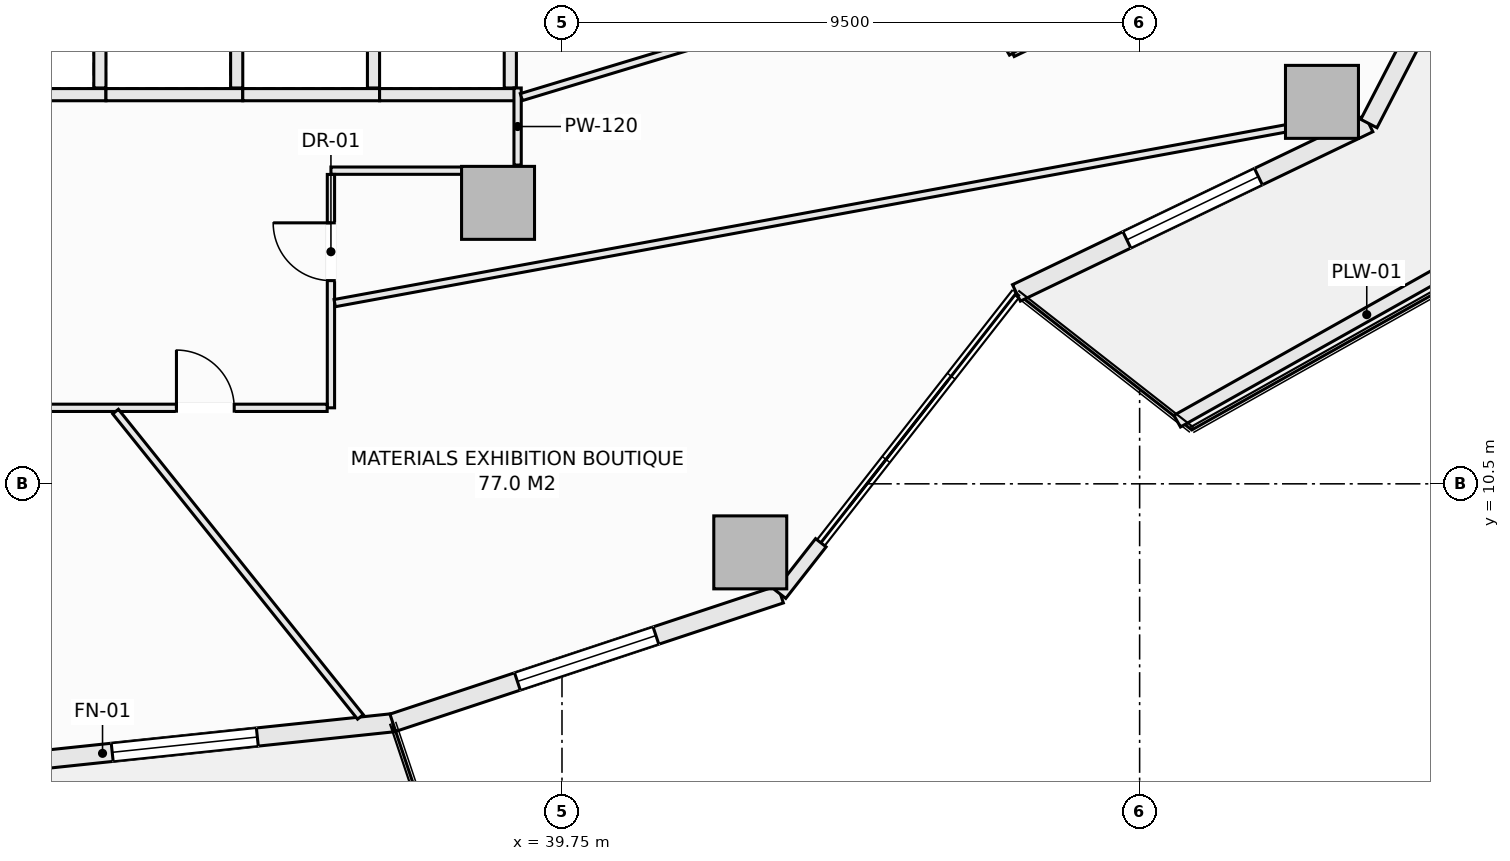
"""IFC4 building model, lengths in metres.
Left out: names, types, materials, properties, quantities, classifications, styles, units other than length and angle.
Written with IfcOpenShell. Run it as: python <this file> out.ifc"""

import sys

from ifc_helpers import new_model, si_unit, direction, frame, frame_2d, origin, origin_2d, place, context, subcontext, project, spatial, rectangle, extrude, element, fill, save


model = new_model("IFC4")
c1 = context("Model", 3, precision=1e-05, world=origin(), true_north=direction((0.0, 1.0)))
c2 = subcontext(c1, "Body", "Model", "MODEL_VIEW")
j1 = project(units=[si_unit("LENGTHUNIT", "METRE"), si_unit("PLANEANGLEUNIT", "RADIAN")], contexts=[c1])
p1 = place(None, origin())
s1 = spatial("IfcSite", under=j1, at=p1, CompositionType="ELEMENT")
p2 = place(p1, origin())
s2 = spatial("IfcBuilding", under=s1, at=p2, CompositionType="ELEMENT")
p3 = place(p2, frame((0.0, 0.0, 53.45)))
s3 = spatial("IfcBuildingStorey", under=s2, at=p3, CompositionType="ELEMENT", Elevation=53.45)
for number, where, z_axis, x_axis in (
    (1, (42.846, 9.373, -0.28), (0.0, 0.0, 1.0), (1.0, 0.0, 0.0)),
    (2, (52.249, 16.781, -0.28), (0.0, 0.0, 1.0), (1.0, 0.0, 0.0)),
    (3, (38.698, 15.121, -0.28), (0.0, 0.0, 1.0), (1.0, 0.0, 0.0)),
):
    element("IfcColumn", number, at=place(p3, frame(where, z_axis=z_axis, x_axis=x_axis)), inside=s3, PredefinedType="COLUMN", context=c2, shape_type="SweptSolid", body=[
        extrude(rectangle(XDim=1.2, YDim=1.2, at=origin_2d()), origin(), (0.0, 0.0, 1.0), 3.85),
    ])
p4 = place(p3, frame((30.125, 5.85, 0.0), z_axis=(0.0, 0.0, 1.0), x_axis=(0.994498840295, 0.104747585419, 0.0)))
e4 = element("IfcWall", 4, at=p4, inside=s3, PredefinedType="SOLIDWALL", context=c2, shape_type="SweptSolid", body=[
    extrude(rectangle(XDim=6.88, YDim=0.3, at=frame_2d((3.44, 0.0))), origin(), (0.0, 0.0, 1.0), 3.093),
])
p5 = place(p4, frame((2.24, 0.0, 0.85)))
e5 = element("IfcOpeningElement", 5, at=p5, cuts=e4, PredefinedType="OPENING", context=c2, shape_type="SweptSolid", body=[
    extrude(rectangle(XDim=2.4, YDim=1.9, at=frame_2d((1.2, 0.95))), frame((0.0, 0.16, 0.0), z_axis=(0.0, -1.0, 0.0), x_axis=(1.0, 0.0, 0.0)), (0.0, 0.0, 1.0), 0.32),
])
p6 = place(p3, frame((36.968, 6.571, 0.0), z_axis=(0.0, 0.0, 1.0), x_axis=(0.949245153629, 0.314537181127, 0.0)))
e6 = element("IfcWall", 6, at=p6, inside=s3, PredefinedType="SOLIDWALL", context=c2, shape_type="SweptSolid", body=[
    extrude(rectangle(XDim=6.717, YDim=0.3, at=frame_2d((3.358, 0.0))), origin(), (0.0, 0.0, 1.0), 3.093),
])
p7 = place(p6, frame((2.159, 0.0, 0.85)))
e7 = element("IfcOpeningElement", 7, at=p7, cuts=e6, PredefinedType="OPENING", context=c2, shape_type="SweptSolid", body=[
    extrude(rectangle(XDim=2.4, YDim=1.9, at=frame_2d((1.2, 0.95))), frame((0.0, 0.16, 0.0), z_axis=(0.0, -1.0, 0.0), x_axis=(1.0, 0.0, 0.0)), (0.0, 0.0, 1.0), 0.32),
])
p8 = place(p3, frame((43.344, 8.684, 0.0), z_axis=(0.0, 0.0, 1.0), x_axis=(0.616387780378, 0.787442762492, 0.0)))
e8 = element("IfcWall", 8, at=p8, inside=s3, PredefinedType="SOLIDWALL", context=c2, shape_type="SweptSolid", body=[
    extrude(rectangle(XDim=1.076, YDim=0.22, at=frame_2d((0.538, 0.0))), origin(), (0.0, 0.0, 1.0), 3.093),
])
p9 = place(p3, frame((47.224, 13.64, 0.0), z_axis=(0.0, 0.0, 1.0), x_axis=(0.901354747727, 0.433081538224, 0.0)))
e9 = element("IfcWall", 9, at=p9, inside=s3, PredefinedType="SOLIDWALL", context=c2, shape_type="SweptSolid", body=[
    extrude(rectangle(XDim=6.431, YDim=0.3, at=frame_2d((3.215, 0.0))), origin(), (0.0, 0.0, 1.0), 3.093),
])
p10 = place(p9, frame((2.015, 0.0, 0.85)))
e10 = element("IfcOpeningElement", 10, at=p10, cuts=e9, PredefinedType="OPENING", context=c2, shape_type="SweptSolid", body=[
    extrude(rectangle(XDim=2.4, YDim=1.9, at=frame_2d((1.2, 0.95))), frame((0.0, 0.16, 0.0), z_axis=(0.0, -1.0, 0.0), x_axis=(1.0, 0.0, 0.0)), (0.0, 0.0, 1.0), 0.32),
])
p11 = place(p3, frame((53.021, 16.425, 0.0), z_axis=(0.0, 0.0, 1.0), x_axis=(0.459800981414, 0.888021991558, 0.0)))
e11 = element("IfcWall", 11, at=p11, inside=s3, PredefinedType="SOLIDWALL", context=c2, shape_type="SweptSolid", body=[
    extrude(rectangle(XDim=5.744, YDim=0.3, at=frame_2d((2.872, 0.0))), origin(), (0.0, 0.0, 1.0), 3.093),
])
p12 = place(p11, frame((1.972, 0.0, 0.0)))
e12 = element("IfcOpeningElement", 12, at=p12, cuts=e11, PredefinedType="OPENING", context=c2, shape_type="SweptSolid", body=[
    extrude(rectangle(XDim=1.8, YDim=2.25, at=frame_2d((0.9, 1.125))), frame((0.0, 0.16, 0.0), z_axis=(0.0, -1.0, 0.0), x_axis=(1.0, 0.0, 0.0)), (0.0, 0.0, 1.0), 0.32),
])
p13 = place(p3, frame((49.868, 11.531, 0.0), z_axis=(0.0, 0.0, 1.0), x_axis=(0.871775109335, 0.489906275468, 0.0)))
e13 = element("IfcWall", 13, at=p13, inside=s3, PredefinedType="PARAPET", context=c2, shape_type="SweptSolid", body=[
    extrude(rectangle(XDim=7.152, YDim=0.22, at=frame_2d((3.576, 0.0))), origin(), (0.0, 0.0, 1.0), 0.52),
])
p14 = place(p3, frame((29.8, 16.9, 0.0), z_axis=(0.0, 0.0, 1.0), x_axis=(1.0, 0.0, 0.0)))
e14 = element("IfcWall", 14, at=p14, inside=s3, PredefinedType="SOLIDWALL", context=c2, shape_type="SweptSolid", body=[
    extrude(rectangle(XDim=2.45, YDim=0.2, at=frame_2d((1.225, 0.0))), origin(), (0.0, 0.0, 1.0), 3.57),
])
p15 = place(p3, frame((32.15, 17.01, 0.0), z_axis=(0.0, 0.0, 1.0), x_axis=(0.0, 1.0, 0.0)))
e15 = element("IfcWall", 15, at=p15, inside=s3, PredefinedType="SOLIDWALL", context=c2, shape_type="SweptSolid", body=[
    extrude(rectangle(XDim=2.43, YDim=0.2, at=frame_2d((1.215, 0.0))), origin(), (0.0, 0.0, 1.0), 3.57),
])
p16 = place(p3, frame((32.25, 16.9, 0.0), z_axis=(0.0, 0.0, 1.0), x_axis=(1.0, 0.0, 0.0)))
e16 = element("IfcWall", 16, at=p16, inside=s3, PredefinedType="SOLIDWALL", context=c2, shape_type="SweptSolid", body=[
    extrude(rectangle(XDim=2.25, YDim=0.2, at=frame_2d((1.125, 0.0))), origin(), (0.0, 0.0, 1.0), 3.57),
])
p17 = place(p3, frame((34.4, 17.01, 0.0), z_axis=(0.0, 0.0, 1.0), x_axis=(0.0, 1.0, 0.0)))
e17 = element("IfcWall", 17, at=p17, inside=s3, PredefinedType="SOLIDWALL", context=c2, shape_type="SweptSolid", body=[
    extrude(rectangle(XDim=2.43, YDim=0.2, at=frame_2d((1.215, 0.0))), origin(), (0.0, 0.0, 1.0), 3.57),
])
p18 = place(p3, frame((34.5, 16.9, 0.0), z_axis=(0.0, 0.0, 1.0), x_axis=(1.0, 0.0, 0.0)))
e18 = element("IfcWall", 18, at=p18, inside=s3, PredefinedType="SOLIDWALL", context=c2, shape_type="SweptSolid", body=[
    extrude(rectangle(XDim=2.25, YDim=0.2, at=frame_2d((1.125, 0.0))), origin(), (0.0, 0.0, 1.0), 3.57),
])
p19 = place(p3, frame((36.65, 17.01, 0.0), z_axis=(0.0, 0.0, 1.0), x_axis=(0.0, 1.0, 0.0)))
e19 = element("IfcWall", 19, at=p19, inside=s3, PredefinedType="SOLIDWALL", context=c2, shape_type="SweptSolid", body=[
    extrude(rectangle(XDim=2.43, YDim=0.2, at=frame_2d((1.215, 0.0))), origin(), (0.0, 0.0, 1.0), 3.57),
])
p20 = place(p3, frame((36.75, 16.9, 0.0), z_axis=(0.0, 0.0, 1.0), x_axis=(1.0, 0.0, 0.0)))
e20 = element("IfcWall", 20, at=p20, inside=s3, PredefinedType="SOLIDWALL", context=c2, shape_type="SweptSolid", body=[
    extrude(rectangle(XDim=2.25, YDim=0.2, at=frame_2d((1.125, 0.0))), origin(), (0.0, 0.0, 1.0), 3.57),
])
p21 = place(p3, frame((38.9, 17.01, 0.0), z_axis=(0.0, 0.0, 1.0), x_axis=(0.0, 1.0, 0.0)))
e21 = element("IfcWall", 21, at=p21, inside=s3, PredefinedType="SOLIDWALL", context=c2, shape_type="SweptSolid", body=[
    extrude(rectangle(XDim=2.43, YDim=0.2, at=frame_2d((1.215, 0.0))), origin(), (0.0, 0.0, 1.0), 3.57),
])
p22 = place(p3, frame((35.95, 15.65, 0.0), z_axis=(0.0, 0.0, 1.0), x_axis=(1.0, 0.0, 0.0)))
e22 = element("IfcWall", 22, at=p22, inside=s3, PredefinedType="PARTITIONING", context=c2, shape_type="SweptSolid", body=[
    extrude(rectangle(XDim=2.291, YDim=0.12, at=frame_2d((1.146, 0.0))), origin(), (0.0, 0.0, 1.0), 3.57),
])
p23 = place(p3, frame((35.95, 11.75, 0.0), z_axis=(0.0, 0.0, 1.0), x_axis=(0.0, 1.0, 0.0)))
e23 = element("IfcWall", 23, at=p23, inside=s3, PredefinedType="PARTITIONING", context=c2, shape_type="SweptSolid", body=[
    extrude(rectangle(XDim=3.838, YDim=0.12, at=frame_2d((1.919, 0.0))), origin(), (0.0, 0.0, 1.0), 3.57),
])
p24 = place(p23, frame((2.092, 0.0, 0.0)))
e24 = element("IfcOpeningElement", 24, at=p24, cuts=e23, PredefinedType="OPENING", context=c2, shape_type="SweptSolid", body=[
    extrude(rectangle(XDim=0.95, YDim=2.1, at=frame_2d((0.475, 1.05))), frame((0.0, 0.07, 0.0), z_axis=(0.0, -1.0, 0.0), x_axis=(1.0, 0.0, 0.0)), (0.0, 0.0, 1.0), 0.14),
])
p25 = place(p3, frame((27.242, 11.75, 0.0), z_axis=(0.0, 0.0, 1.0), x_axis=(1.0, 0.0, 0.0)))
e25 = element("IfcWall", 25, at=p25, inside=s3, PredefinedType="PARTITIONING", context=c2, shape_type="SweptSolid", body=[
    extrude(rectangle(XDim=8.646, YDim=0.12, at=frame_2d((4.323, 0.0))), origin(), (0.0, 0.0, 1.0), 3.57),
])
p26 = place(p25, frame((2.322, 0.0, 0.0)))
e26 = element("IfcOpeningElement", 26, at=p26, cuts=e25, PredefinedType="OPENING", context=c2, shape_type="SweptSolid", body=[
    extrude(rectangle(XDim=0.95, YDim=2.1, at=frame_2d((0.475, 1.05))), frame((0.0, 0.07, 0.0), z_axis=(0.0, -1.0, 0.0), x_axis=(1.0, 0.0, 0.0)), (0.0, 0.0, 1.0), 0.14),
])
p27 = place(p25, frame((6.167, 0.0, 0.0)))
e27 = element("IfcOpeningElement", 27, at=p27, cuts=e25, PredefinedType="OPENING", context=c2, shape_type="SweptSolid", body=[
    extrude(rectangle(XDim=0.95, YDim=2.1, at=frame_2d((0.475, 1.05))), frame((0.0, 0.07, 0.0), z_axis=(0.0, -1.0, 0.0), x_axis=(1.0, 0.0, 0.0)), (0.0, 0.0, 1.0), 0.14),
])
p28 = place(p3, frame((47.161, 17.581, 0.0), z_axis=(0.0, 0.0, 1.0), x_axis=(0.901265146481, 0.433267972204, 0.0)))
e28 = element("IfcWall", 28, at=p28, inside=s3, PredefinedType="PARTITIONING", context=c2, shape_type="SweptSolid", body=[
    extrude(rectangle(XDim=2.306, YDim=0.12, at=frame_2d((1.153, 0.0))), origin(), (0.0, 0.0, 1.0), 3.57),
])
p29 = place(p3, frame((43.974, 23.02, 0.0), z_axis=(0.0, 0.0, 1.0), x_axis=(0.505531634194, -0.862808070679, 0.0)))
e29 = element("IfcWall", 29, at=p29, inside=s3, PredefinedType="PARTITIONING", context=c2, shape_type="SweptSolid", body=[
    extrude(rectangle(XDim=6.304, YDim=0.12, at=frame_2d((3.152, 0.0))), origin(), (0.0, 0.0, 1.0), 3.205),
])
p30 = place(p3, frame((39.02, 15.742, 0.0), z_axis=(0.0, 0.0, 1.0), x_axis=(0.0, 1.0, 0.0)))
e30 = element("IfcWall", 30, at=p30, inside=s3, PredefinedType="PARTITIONING", context=c2, shape_type="SweptSolid", body=[
    extrude(rectangle(XDim=1.268, YDim=0.12, at=frame_2d((0.634, 0.0))), origin(), (0.0, 0.0, 1.0), 2.934),
])
p31 = place(p3, frame((39.082, 16.86, 0.0), z_axis=(0.0, 0.0, 1.0), x_axis=(0.957120973048, 0.289688527476, 0.0)))
e31 = element("IfcWall", 31, at=p31, inside=s3, PredefinedType="PARTITIONING", context=c2, shape_type="SweptSolid", body=[
    extrude(rectangle(XDim=7.48, YDim=0.12, at=frame_2d((3.74, 0.0))), origin(), (0.0, 0.0, 1.0), 3.57),
])
p32 = place(p3, frame((36.012, 13.472, 0.0), z_axis=(0.0, 0.0, 1.0), x_axis=(0.983545247648, 0.180661965641, 0.0)))
e32 = element("IfcWall", 32, at=p32, inside=s3, PredefinedType="PARTITIONING", context=c2, shape_type="SweptSolid", body=[
    extrude(rectangle(XDim=17.073, YDim=0.12, at=frame_2d((8.537, 0.0))), origin(), (0.0, 0.0, 1.0), 3.093),
])
p33 = place(p3, frame((32.408, 11.688, 0.0), z_axis=(0.0, 0.0, 1.0), x_axis=(0.625707614962, -0.780057677725, 0.0)))
e33 = element("IfcWall", 33, at=p33, inside=s3, PredefinedType="PARTITIONING", context=c2, shape_type="SweptSolid", body=[
    extrude(rectangle(XDim=6.436, YDim=0.12, at=frame_2d((3.218, 0.0))), origin(), (0.0, 0.0, 1.0), 3.57),
])
p34 = place(p5, origin())
e34 = element("IfcWindow", 34, at=p34, inside=s3, PartitioningType="SINGLE_PANEL", PredefinedType="WINDOW", context=c2, shape_type="SweptSolid", body=[
    extrude(rectangle(XDim=2.4, YDim=1.9, at=frame_2d((1.2, 0.95))), frame((0.0, 0.03, 0.0), z_axis=(0.0, -1.0, 0.0), x_axis=(1.0, 0.0, 0.0)), (0.0, 0.0, 1.0), 0.06),
])
fill(e5, e34)
p35 = place(p7, origin())
e35 = element("IfcWindow", 35, at=p35, inside=s3, PartitioningType="SINGLE_PANEL", PredefinedType="WINDOW", context=c2, shape_type="SweptSolid", body=[
    extrude(rectangle(XDim=2.4, YDim=1.9, at=frame_2d((1.2, 0.95))), frame((0.0, 0.03, 0.0), z_axis=(0.0, -1.0, 0.0), x_axis=(1.0, 0.0, 0.0)), (0.0, 0.0, 1.0), 0.06),
])
fill(e7, e35)
p36 = place(p10, origin())
e36 = element("IfcWindow", 36, at=p36, inside=s3, PartitioningType="SINGLE_PANEL", PredefinedType="WINDOW", context=c2, shape_type="SweptSolid", body=[
    extrude(rectangle(XDim=2.4, YDim=1.9, at=frame_2d((1.2, 0.95))), frame((0.0, 0.03, 0.0), z_axis=(0.0, -1.0, 0.0), x_axis=(1.0, 0.0, 0.0)), (0.0, 0.0, 1.0), 0.06),
])
fill(e10, e36)
p37 = place(p27, origin())
e37 = element("IfcDoor", 37, at=p37, inside=s3, OperationType="SINGLE_SWING_LEFT", PredefinedType="DOOR", context=c2, shape_type="SweptSolid", body=[
    extrude(rectangle(XDim=0.95, YDim=2.1, at=frame_2d((0.475, 1.05))), frame((0.0, 0.025, 0.0), z_axis=(0.0, -1.0, 0.0), x_axis=(1.0, 0.0, 0.0)), (0.0, 0.0, 1.0), 0.05),
])
fill(e27, e37)
p38 = place(p24, origin())
e38 = element("IfcDoor", 38, at=p38, inside=s3, OperationType="SINGLE_SWING_RIGHT", PredefinedType="DOOR", context=c2, shape_type="SweptSolid", body=[
    extrude(rectangle(XDim=0.95, YDim=2.1, at=frame_2d((0.475, 1.05))), frame((0.0, 0.025, 0.0), z_axis=(0.0, -1.0, 0.0), x_axis=(1.0, 0.0, 0.0)), (0.0, 0.0, 1.0), 0.05),
])
fill(e24, e38)
save(model, sys.argv[1])
